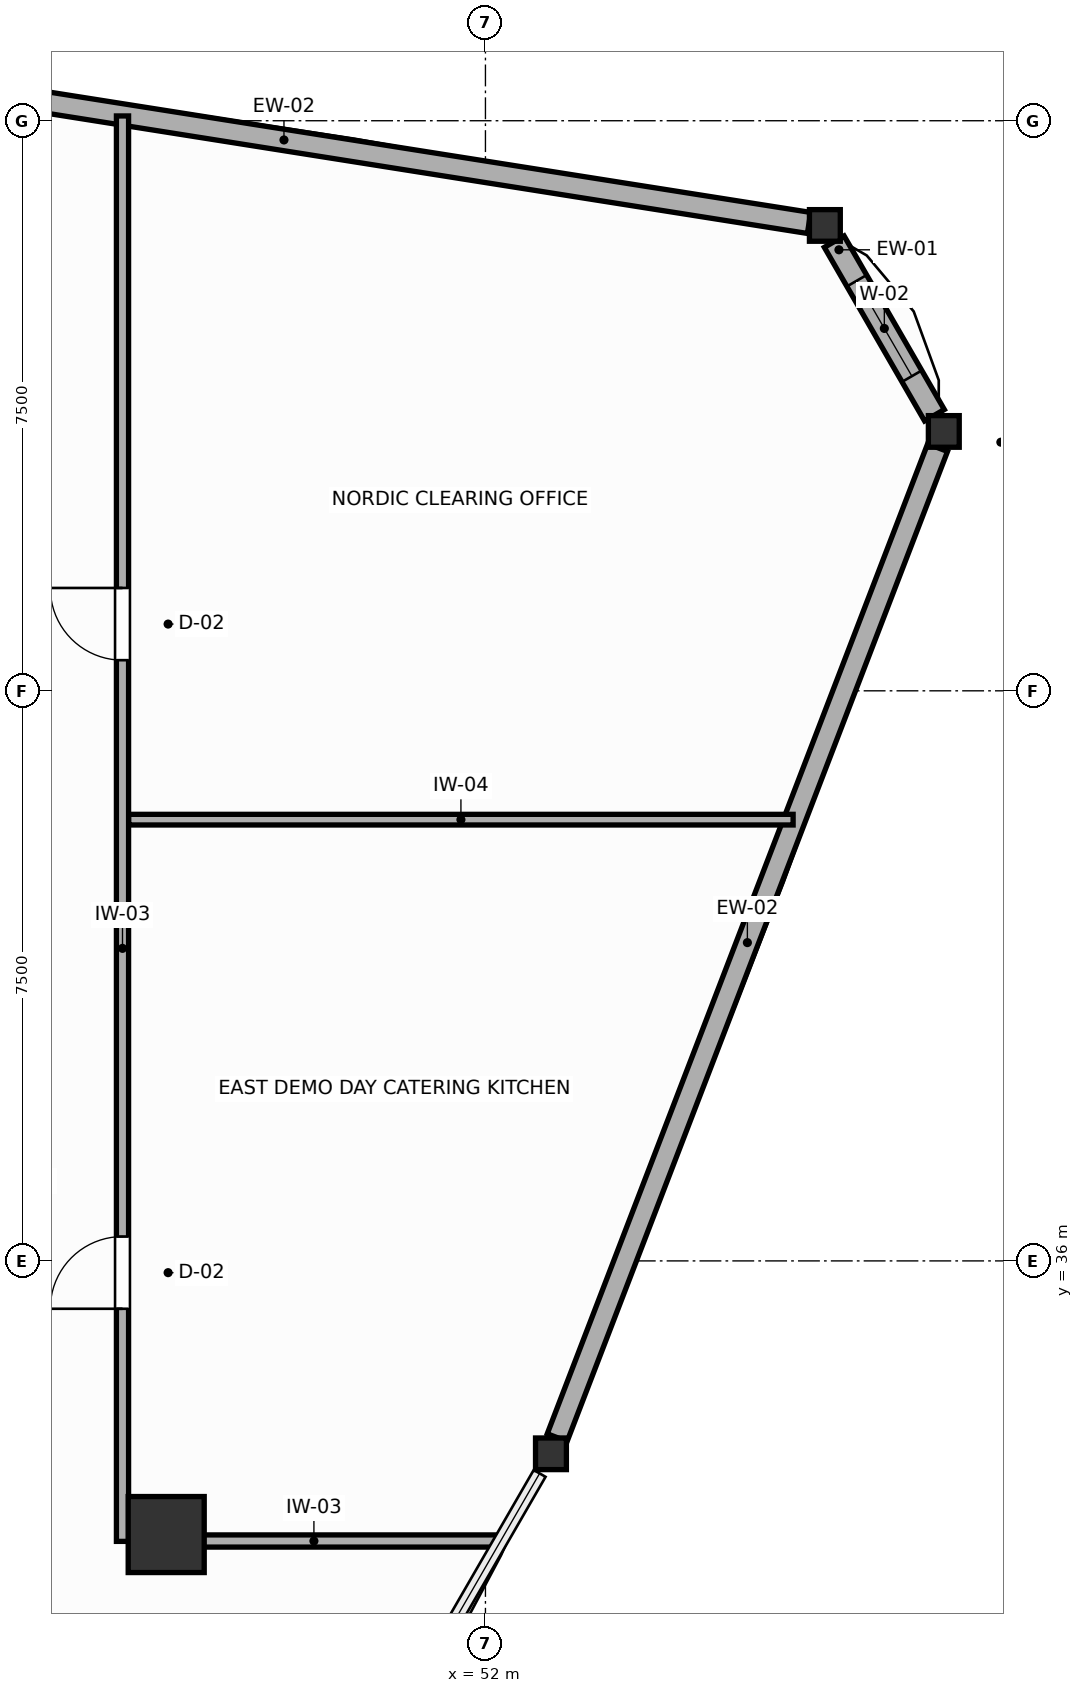
"""IFC4 building model, lengths in metres.
Left out: names, types, materials, properties, quantities, classifications, styles, units other than length and angle.
Written with IfcOpenShell. Run it as: python <this file> out.ifc"""

import sys

from ifc_helpers import new_model, si_unit, direction, frame, frame_2d, origin, origin_2d, place, context, subcontext, project, spatial, rectangle, i_section, extrude, source, transform, mapped, element, fill, save


model = new_model("IFC4")
c1 = context("Model", 3, precision=1e-05, world=origin(), true_north=direction((0.0, 1.0)))
c2 = subcontext(c1, "Body", "Model", "MODEL_VIEW")
j1 = project(units=[si_unit("LENGTHUNIT", "METRE"), si_unit("PLANEANGLEUNIT", "RADIAN")], contexts=[c1])
p1 = place(None, origin())
s1 = spatial("IfcSite", under=j1, at=p1, CompositionType="ELEMENT")
p2 = place(p1, origin())
s2 = spatial("IfcBuilding", under=s1, at=p2, CompositionType="ELEMENT")
p3 = place(p2, frame((0.0, 0.0, 193.8)))
s3 = spatial("IfcBuildingStorey", under=s2, at=p3, CompositionType="ELEMENT", Elevation=193.8)
m1 = source(origin(), c2, "Body", "SweptSolid", [
    extrude(rectangle(XDim=1.0, YDim=1.0, at=origin_2d()), origin(), (0.0, 0.0, 1.0), 3.6),
])
p4 = place(p3, frame((47.8, 32.4, 0.0), z_axis=(0.0, 0.0, 1.0), x_axis=(1.0, 0.0, 0.0)))
e1 = element("IfcColumn", 1, at=p4, inside=s3, PredefinedType="COLUMN", context=c2, shape_type="MappedRepresentation", body=[
    mapped(m1, transform((0.0, 0.0, 0.0), scale=1.0)),
])
m2 = source(origin(), c2, "Body", "SweptSolid", [
    extrude(i_section(OverallWidth=0.406, OverallDepth=0.416, WebThickness=0.027, FlangeThickness=0.044, FilletRadius=0.015, at=origin_2d()), origin(), (0.0, 0.0, 1.0), 3.6),
])
for number, where, z_axis, x_axis in (
    (2, (58.03, 46.912, 0.0), (0.0, 0.0, 1.0), (1.0, 0.0, 0.0)),
    (3, (56.466, 49.623, 0.0), (0.0, 0.0, 1.0), (1.0, 0.0, 0.0)),
    (4, (52.862, 33.462, 0.0), (0.0, 0.0, 1.0), (1.0, 0.0, 0.0)),
):
    element("IfcColumn", number, at=place(p3, frame(where, z_axis=z_axis, x_axis=x_axis)), inside=s3, PredefinedType="COLUMN", context=c2, shape_type="MappedRepresentation", body=[
        mapped(m2, transform((0.0, 0.0, 0.0), scale=1.0)),
    ])
p5 = place(p3, frame((57.907, 47.125, 0.0), z_axis=(0.0, 0.0, 1.0), x_axis=(-0.500061666259, 0.865989797826, 0.0)))
e5 = element("IfcWall", 5, at=p5, inside=s3, PredefinedType="SOLIDWALL", context=c2, shape_type="SweptSolid", body=[
    extrude(rectangle(XDim=2.637, YDim=0.3, at=frame_2d((1.319, 0.0))), origin(), (0.0, 0.0, 1.0), 3.01),
])
p6 = place(p5, frame((0.594, 0.0, 0.75)))
e6 = element("IfcOpeningElement", 6, at=p6, cuts=e5, PredefinedType="OPENING", context=c2, shape_type="SweptSolid", body=[
    extrude(rectangle(XDim=1.45, YDim=1.65, at=frame_2d((0.725, 0.825))), frame((0.0, 0.16, 0.0), z_axis=(0.0, -1.0, 0.0), x_axis=(1.0, 0.0, 0.0)), (0.0, 0.0, 1.0), 0.32),
])
p7 = place(p3, frame((56.258, 49.656, 0.0), z_axis=(0.0, 0.0, 1.0), x_axis=(-0.987743003355, 0.15608894683, 0.0)))
e7 = element("IfcWall", 7, at=p7, inside=s3, PredefinedType="SOLIDWALL", context=c2, shape_type="SweptSolid", body=[
    extrude(rectangle(XDim=13.988, YDim=0.28, at=frame_2d((6.994, 0.0))), origin(), (0.0, 0.0, 1.0), 3.01),
])
p8 = place(p3, frame((52.944, 33.675, 0.0), z_axis=(0.0, 0.0, 1.0), x_axis=(0.358703519473, 0.933451544065, 0.0)))
e8 = element("IfcWall", 8, at=p8, inside=s3, PredefinedType="SOLIDWALL", context=c2, shape_type="SweptSolid", body=[
    extrude(rectangle(XDim=13.953, YDim=0.28, at=frame_2d((6.976, 0.0))), origin(), (0.0, 0.0, 1.0), 3.01),
])
p9 = place(p3, frame((47.225, 32.31, 0.0), z_axis=(0.0, 0.0, 1.0), x_axis=(0.0, 1.0, 0.0)))
e9 = element("IfcWall", 9, at=p9, inside=s3, PredefinedType="PARTITIONING", context=c2, shape_type="SweptSolid", body=[
    extrude(rectangle(XDim=18.753, YDim=0.16, at=frame_2d((9.376, 0.0))), origin(), (0.0, 0.0, 1.0), 3.4),
])
p10 = place(p9, frame((3.06, 0.0, 0.0)))
e10 = element("IfcOpeningElement", 10, at=p10, cuts=e9, PredefinedType="OPENING", context=c2, shape_type="SweptSolid", body=[
    extrude(rectangle(XDim=0.95, YDim=2.05, at=frame_2d((0.475, 1.025))), frame((0.0, 0.09, 0.0), z_axis=(0.0, -1.0, 0.0), x_axis=(1.0, 0.0, 0.0)), (0.0, 0.0, 1.0), 0.18),
])
p11 = place(p9, frame((11.593, 0.0, 0.0)))
e11 = element("IfcOpeningElement", 11, at=p11, cuts=e9, PredefinedType="OPENING", context=c2, shape_type="SweptSolid", body=[
    extrude(rectangle(XDim=0.95, YDim=2.05, at=frame_2d((0.475, 1.025))), frame((0.0, 0.09, 0.0), z_axis=(0.0, -1.0, 0.0), x_axis=(1.0, 0.0, 0.0)), (0.0, 0.0, 1.0), 0.18),
])
p12 = place(p3, frame((47.307, 32.315, 0.0), z_axis=(0.0, 0.0, 1.0), x_axis=(1.0, 0.0, 0.0)))
e12 = element("IfcWall", 12, at=p12, inside=s3, PredefinedType="PARTITIONING", context=c2, shape_type="SweptSolid", body=[
    extrude(rectangle(XDim=4.873, YDim=0.16, at=frame_2d((2.437, 0.0))), origin(), (0.0, 0.0, 1.0), 2.95),
])
p13 = place(p3, frame((47.307, 41.805, 0.0), z_axis=(0.0, 0.0, 1.0), x_axis=(1.0, 0.0, 0.0)))
e13 = element("IfcWall", 13, at=p13, inside=s3, PredefinedType="PARTITIONING", context=c2, shape_type="SweptSolid", body=[
    extrude(rectangle(XDim=8.741, YDim=0.14, at=frame_2d((4.37, 0.0))), origin(), (0.0, 0.0, 1.0), 3.4),
])
p14 = place(p6, origin())
e14 = element("IfcWindow", 14, at=p14, inside=s3, PartitioningType="SINGLE_PANEL", PredefinedType="WINDOW", context=c2, shape_type="SweptSolid", body=[
    extrude(rectangle(XDim=1.45, YDim=1.65, at=frame_2d((0.725, 0.825))), frame((0.0, 0.03, 0.0), z_axis=(0.0, -1.0, 0.0), x_axis=(1.0, 0.0, 0.0)), (0.0, 0.0, 1.0), 0.06),
])
fill(e6, e14)
p15 = place(p10, origin())
e15 = element("IfcDoor", 15, at=p15, inside=s3, OperationType="SINGLE_SWING_LEFT", PredefinedType="DOOR", context=c2, shape_type="SweptSolid", body=[
    extrude(rectangle(XDim=0.95, YDim=2.05, at=frame_2d((0.475, 1.025))), frame((0.0, 0.025, 0.0), z_axis=(0.0, -1.0, 0.0), x_axis=(1.0, 0.0, 0.0)), (0.0, 0.0, 1.0), 0.05),
])
fill(e10, e15)
p16 = place(p11, origin())
e16 = element("IfcDoor", 16, at=p16, inside=s3, OperationType="SINGLE_SWING_RIGHT", PredefinedType="DOOR", context=c2, shape_type="SweptSolid", body=[
    extrude(rectangle(XDim=0.95, YDim=2.05, at=frame_2d((0.475, 1.025))), frame((0.0, 0.025, 0.0), z_axis=(0.0, -1.0, 0.0), x_axis=(1.0, 0.0, 0.0)), (0.0, 0.0, 1.0), 0.05),
])
fill(e11, e16)
save(model, sys.argv[1])
